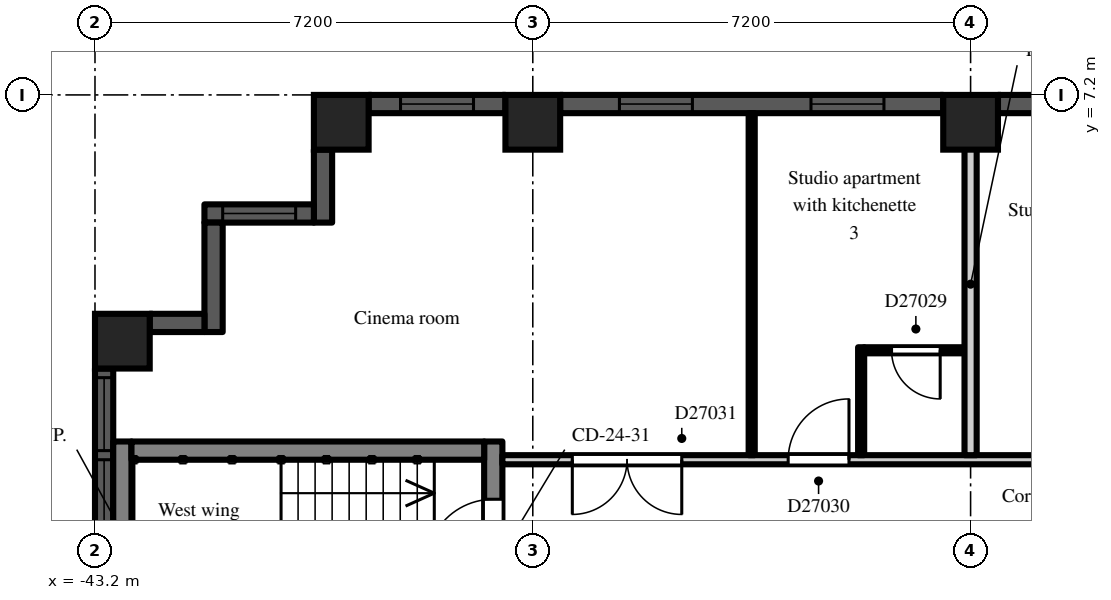
"""IFC4 building model, lengths in metres.
Left out: names, types, materials, properties, quantities, classifications, styles, units other than length and angle.
Written with IfcOpenShell. Run it as: python <this file> out.ifc"""

import sys

from ifc_helpers import new_model, si_unit, direction, frame, frame_2d, origin, origin_2d, place, context, subcontext, project, spatial, rectangle, extrude, element, fill, save


model = new_model("IFC4")
c1 = context("Model", 3, precision=1e-05, world=origin(), true_north=direction((0.0, 1.0)))
c2 = subcontext(c1, "Body", "Model", "MODEL_VIEW")
j1 = project(units=[si_unit("LENGTHUNIT", "METRE"), si_unit("PLANEANGLEUNIT", "RADIAN")], contexts=[c1])
p1 = place(None, origin())
s1 = spatial("IfcSite", under=j1, at=p1, CompositionType="ELEMENT")
p2 = place(p1, origin())
s2 = spatial("IfcBuilding", under=s1, at=p2, CompositionType="ELEMENT")
p3 = place(p2, frame((0.0, 0.0, 188.7)))
s3 = spatial("IfcBuildingStorey", under=s2, at=p3, CompositionType="ELEMENT", Elevation=188.7)
for number, where, z_axis, x_axis in (
    (1, (-42.75, 3.15, 0.0), (0.0, 0.0, 1.0), (1.0, 0.0, 0.0)),
    (2, (-39.15, 6.75, 0.0), (0.0, 0.0, 1.0), (1.0, 0.0, 0.0)),
    (3, (-36.0, 6.75, 0.0), (0.0, 0.0, 1.0), (1.0, 0.0, 0.0)),
    (4, (-28.8, 6.75, 0.0), (0.0, 0.0, 1.0), (1.0, 0.0, 0.0)),
):
    element("IfcColumn", number, at=place(p3, frame(where, z_axis=z_axis, x_axis=x_axis)), inside=s3, PredefinedType="COLUMN", context=c2, shape_type="SweptSolid", body=[
        extrude(rectangle(XDim=0.9, YDim=0.9, at=origin_2d()), origin(), (0.0, 0.0, 1.0), 3.0),
    ])
p4 = place(p3, frame((-25.2, 7.05, 0.0), z_axis=(0.0, 0.0, 1.0), x_axis=(-1.0, 0.0, 0.0)))
e5 = element("IfcWall", 5, at=p4, inside=s3, PredefinedType="SOLIDWALL", context=c2, shape_type="SweptSolid", body=[
    extrude(rectangle(XDim=3.15, YDim=0.3, at=frame_2d((1.575, 0.0))), origin(), (0.0, 0.0, 1.0), 2.2),
])
p5 = place(p4, frame((0.975, 0.0, 0.2)))
e6 = element("IfcOpeningElement", 6, at=p5, cuts=e5, PredefinedType="OPENING", context=c2, shape_type="SweptSolid", body=[
    extrude(rectangle(XDim=1.2, YDim=1.85, at=frame_2d((0.6, 0.925))), frame((0.0, 0.16, 0.0), z_axis=(0.0, -1.0, 0.0), x_axis=(1.0, 0.0, 0.0)), (0.0, 0.0, 1.0), 0.32),
])
p6 = place(p3, frame((-29.25, 7.05, 0.0), z_axis=(0.0, 0.0, 1.0), x_axis=(-1.0, 0.0, 0.0)))
e7 = element("IfcWall", 7, at=p6, inside=s3, PredefinedType="SOLIDWALL", context=c2, shape_type="SweptSolid", body=[
    extrude(rectangle(XDim=6.3, YDim=0.3, at=frame_2d((3.15, 0.0))), origin(), (0.0, 0.0, 1.0), 2.2),
])
p7 = place(p6, frame((0.975, 0.0, 0.2)))
e8 = element("IfcOpeningElement", 8, at=p7, cuts=e7, PredefinedType="OPENING", context=c2, shape_type="SweptSolid", body=[
    extrude(rectangle(XDim=1.2, YDim=1.85, at=frame_2d((0.6, 0.925))), frame((0.0, 0.16, 0.0), z_axis=(0.0, -1.0, 0.0), x_axis=(1.0, 0.0, 0.0)), (0.0, 0.0, 1.0), 0.32),
])
p8 = place(p6, frame((4.125, 0.0, 0.2)))
e9 = element("IfcOpeningElement", 9, at=p8, cuts=e7, PredefinedType="OPENING", context=c2, shape_type="SweptSolid", body=[
    extrude(rectangle(XDim=1.2, YDim=1.85, at=frame_2d((0.6, 0.925))), frame((0.0, 0.16, 0.0), z_axis=(0.0, -1.0, 0.0), x_axis=(1.0, 0.0, 0.0)), (0.0, 0.0, 1.0), 0.32),
])
p9 = place(p3, frame((-36.45, 7.05, 0.0), z_axis=(0.0, 0.0, 1.0), x_axis=(-1.0, 0.0, 0.0)))
e10 = element("IfcWall", 10, at=p9, inside=s3, PredefinedType="SOLIDWALL", context=c2, shape_type="SweptSolid", body=[
    extrude(rectangle(XDim=2.25, YDim=0.3, at=frame_2d((1.125, 0.0))), origin(), (0.0, 0.0, 1.0), 2.2),
])
p10 = place(p9, frame((0.525, 0.0, 0.2)))
e11 = element("IfcOpeningElement", 11, at=p10, cuts=e10, PredefinedType="OPENING", context=c2, shape_type="SweptSolid", body=[
    extrude(rectangle(XDim=1.2, YDim=1.85, at=frame_2d((0.6, 0.925))), frame((0.0, 0.16, 0.0), z_axis=(0.0, -1.0, 0.0), x_axis=(1.0, 0.0, 0.0)), (0.0, 0.0, 1.0), 0.32),
])
p11 = place(p3, frame((-39.45, 6.3, 0.0), z_axis=(0.0, 0.0, 1.0), x_axis=(0.0, -1.0, 0.0)))
e12 = element("IfcWall", 12, at=p11, inside=s3, PredefinedType="SOLIDWALL", context=c2, shape_type="SweptSolid", body=[
    extrude(rectangle(XDim=1.2, YDim=0.3, at=frame_2d((0.6, 0.0))), origin(), (0.0, 0.0, 1.0), 2.6),
])
p12 = place(p3, frame((-39.6, 5.25, 0.0), z_axis=(0.0, 0.0, 1.0), x_axis=(-1.0, 0.0, 0.0)))
e13 = element("IfcWall", 13, at=p12, inside=s3, PredefinedType="SOLIDWALL", context=c2, shape_type="SweptSolid", body=[
    extrude(rectangle(XDim=1.8, YDim=0.3, at=frame_2d((0.9, 0.0))), origin(), (0.0, 0.0, 1.0), 2.6),
])
p13 = place(p12, frame((0.3, 0.0, 0.2)))
e14 = element("IfcOpeningElement", 14, at=p13, cuts=e13, PredefinedType="OPENING", context=c2, shape_type="SweptSolid", body=[
    extrude(rectangle(XDim=1.2, YDim=1.85, at=frame_2d((0.6, 0.925))), frame((0.0, 0.16, 0.0), z_axis=(0.0, -1.0, 0.0), x_axis=(1.0, 0.0, 0.0)), (0.0, 0.0, 1.0), 0.32),
])
p14 = place(p3, frame((-41.25, 5.1, 0.0), z_axis=(0.0, 0.0, 1.0), x_axis=(0.0, -1.0, 0.0)))
e15 = element("IfcWall", 15, at=p14, inside=s3, PredefinedType="SOLIDWALL", context=c2, shape_type="SweptSolid", body=[
    extrude(rectangle(XDim=1.8, YDim=0.3, at=frame_2d((0.9, 0.0))), origin(), (0.0, 0.0, 1.0), 2.6),
])
p15 = place(p3, frame((-41.4, 3.45, 0.0), z_axis=(0.0, 0.0, 1.0), x_axis=(-1.0, 0.0, 0.0)))
e16 = element("IfcWall", 16, at=p15, inside=s3, PredefinedType="SOLIDWALL", context=c2, shape_type="SweptSolid", body=[
    extrude(rectangle(XDim=0.9, YDim=0.3, at=frame_2d((0.45, 0.0))), origin(), (0.0, 0.0, 1.0), 2.6),
])
p16 = place(p3, frame((-43.05, 2.7, 0.0), z_axis=(0.0, 0.0, 1.0), x_axis=(0.0, -1.0, 0.0)))
e17 = element("IfcWall", 17, at=p16, inside=s3, PredefinedType="SOLIDWALL", context=c2, shape_type="SweptSolid", body=[
    extrude(rectangle(XDim=5.4, YDim=0.3, at=frame_2d((2.7, 0.0))), origin(), (0.0, 0.0, 1.0), 2.2),
])
p17 = place(p16, frame((1.5, 0.0, 0.2)))
e18 = element("IfcOpeningElement", 18, at=p17, cuts=e17, PredefinedType="OPENING", context=c2, shape_type="SweptSolid", body=[
    extrude(rectangle(XDim=2.4, YDim=1.85, at=frame_2d((1.2, 0.925))), frame((0.0, 0.16, 0.0), z_axis=(0.0, -1.0, 0.0), x_axis=(1.0, 0.0, 0.0)), (0.0, 0.0, 1.0), 0.32),
])
p18 = place(p16, frame((0.15, 0.0, 0.2)))
e19 = element("IfcOpeningElement", 19, at=p18, cuts=e17, PredefinedType="OPENING", context=c2, shape_type="SweptSolid", body=[
    extrude(rectangle(XDim=1.2, YDim=1.85, at=frame_2d((0.6, 0.925))), frame((0.0, 0.16, 0.0), z_axis=(0.0, -1.0, 0.0), x_axis=(1.0, 0.0, 0.0)), (0.0, 0.0, 1.0), 0.32),
])
p19 = place(p3, frame((-36.65, -1.5, 0.0), z_axis=(0.0, 0.0, 1.0), x_axis=(0.0, 1.0, 0.0)))
e20 = element("IfcWall", 20, at=p19, inside=s3, PredefinedType="SHEAR", context=c2, shape_type="SweptSolid", body=[
    extrude(rectangle(XDim=3.0, YDim=0.3, at=frame_2d((1.5, 0.0))), origin(), (0.0, 0.0, 1.0), 2.6),
])
p20 = place(p19, frame((0.95, 0.0, 0.0)))
e21 = element("IfcOpeningElement", 21, at=p20, cuts=e20, PredefinedType="OPENING", context=c2, shape_type="SweptSolid", body=[
    extrude(rectangle(XDim=1.1, YDim=2.1, at=frame_2d((0.55, 1.05))), frame((0.0, 0.16, 0.0), z_axis=(0.0, -1.0, 0.0), x_axis=(1.0, 0.0, 0.0)), (0.0, 0.0, 1.0), 0.32),
])
p21 = place(p3, frame((-42.75, -1.5, 0.0), z_axis=(0.0, 0.0, 1.0), x_axis=(0.0, 1.0, 0.0)))
e22 = element("IfcWall", 22, at=p21, inside=s3, PredefinedType="SHEAR", context=c2, shape_type="SweptSolid", body=[
    extrude(rectangle(XDim=3.0, YDim=0.3, at=frame_2d((1.5, 0.0))), origin(), (0.0, 0.0, 1.0), 2.6),
])
p22 = place(p3, frame((-36.8, 1.35, 0.0), z_axis=(0.0, 0.0, 1.0), x_axis=(-1.0, 0.0, 0.0)))
e23 = element("IfcWall", 23, at=p22, inside=s3, PredefinedType="SHEAR", context=c2, shape_type="SweptSolid", body=[
    extrude(rectangle(XDim=5.8, YDim=0.3, at=frame_2d((2.9, 0.0))), origin(), (0.0, 0.0, 1.0), 2.6),
])
p23 = place(p3, frame((-36.5, 1.2, 0.0), z_axis=(0.0, 0.0, 1.0), x_axis=(1.0, 0.0, 0.0)))
e24 = element("IfcWall", 24, at=p23, inside=s3, PredefinedType="PARTITIONING", context=c2, shape_type="SweptSolid", body=[
    extrude(rectangle(XDim=14.9, YDim=0.15, at=frame_2d((7.45, 0.0))), origin(), (0.0, 0.0, 1.0), 2.6),
])
p24 = place(p23, frame((10.1, 0.0, 0.0)))
e25 = element("IfcOpeningElement", 25, at=p24, cuts=e24, PredefinedType="OPENING", context=c2, shape_type="SweptSolid", body=[
    extrude(rectangle(XDim=1.0, YDim=2.1, at=frame_2d((0.5, 1.05))), frame((0.0, 0.085, 0.0), z_axis=(0.0, -1.0, 0.0), x_axis=(1.0, 0.0, 0.0)), (0.0, 0.0, 1.0), 0.17),
])
p25 = place(p23, frame((4.7, 0.0, 0.0)))
e26 = element("IfcOpeningElement", 26, at=p25, cuts=e24, PredefinedType="OPENING", context=c2, shape_type="SweptSolid", body=[
    extrude(rectangle(XDim=1.0, YDim=2.1, at=frame_2d((0.5, 1.05))), frame((0.0, 0.085, 0.0), z_axis=(0.0, -1.0, 0.0), x_axis=(1.0, 0.0, 0.0)), (0.0, 0.0, 1.0), 0.17),
])
p26 = place(p23, frame((1.15, 0.0, 0.0)))
e27 = element("IfcOpeningElement", 27, at=p26, cuts=e24, PredefinedType="OPENING", context=c2, shape_type="SweptSolid", body=[
    extrude(rectangle(XDim=1.8, YDim=2.1, at=frame_2d((0.9, 1.05))), frame((0.0, 0.085, 0.0), z_axis=(0.0, -1.0, 0.0), x_axis=(1.0, 0.0, 0.0)), (0.0, 0.0, 1.0), 0.17),
])
p27 = place(p3, frame((-32.4, 1.275, 0.0), z_axis=(0.0, 0.0, 1.0), x_axis=(0.0, 1.0, 0.0)))
e28 = element("IfcWall", 28, at=p27, inside=s3, PredefinedType="PARTITIONING", context=c2, shape_type="SweptSolid", body=[
    extrude(rectangle(XDim=5.625, YDim=0.1, at=frame_2d((2.812, 0.0))), origin(), (0.0, 0.0, 1.0), 2.6),
])
p28 = place(p3, frame((-30.6, 1.275, 0.0), z_axis=(0.0, 0.0, 1.0), x_axis=(0.0, 1.0, 0.0)))
e29 = element("IfcWall", 29, at=p28, inside=s3, PredefinedType="PARTITIONING", context=c2, shape_type="SweptSolid", body=[
    extrude(rectangle(XDim=1.775, YDim=0.1, at=frame_2d((0.888, 0.0))), origin(), (0.0, 0.0, 1.0), 2.6),
])
p29 = place(p3, frame((-30.55, 3.0, 0.0), z_axis=(0.0, 0.0, 1.0), x_axis=(1.0, 0.0, 0.0)))
e30 = element("IfcWall", 30, at=p29, inside=s3, PredefinedType="PARTITIONING", context=c2, shape_type="SweptSolid", body=[
    extrude(rectangle(XDim=1.65, YDim=0.1, at=frame_2d((0.825, 0.0))), origin(), (0.0, 0.0, 1.0), 2.6),
])
p30 = place(p29, frame((0.45, 0.0, 0.0)))
e31 = element("IfcOpeningElement", 31, at=p30, cuts=e30, PredefinedType="OPENING", context=c2, shape_type="SweptSolid", body=[
    extrude(rectangle(XDim=0.8, YDim=2.1, at=frame_2d((0.4, 1.05))), frame((0.0, 0.06, 0.0), z_axis=(0.0, -1.0, 0.0), x_axis=(1.0, 0.0, 0.0)), (0.0, 0.0, 1.0), 0.12),
])
p31 = place(p3, frame((-28.8, 1.275, 0.0), z_axis=(0.0, 0.0, 1.0), x_axis=(0.0, 1.0, 0.0)))
e32 = element("IfcWall", 32, at=p31, inside=s3, PredefinedType="PARTITIONING", context=c2, shape_type="SweptSolid", body=[
    extrude(rectangle(XDim=5.625, YDim=0.2, at=frame_2d((2.812, 0.0))), origin(), (0.0, 0.0, 1.0), 2.6),
])
p32 = place(p7, origin())
e33 = element("IfcWindow", 33, at=p32, inside=s3, PartitioningType="SINGLE_PANEL", PredefinedType="WINDOW", context=c2, shape_type="SweptSolid", body=[
    extrude(rectangle(XDim=1.2, YDim=1.85, at=frame_2d((0.6, 0.925))), frame((0.0, 0.03, 0.0), z_axis=(0.0, -1.0, 0.0), x_axis=(1.0, 0.0, 0.0)), (0.0, 0.0, 1.0), 0.06),
])
fill(e8, e33)
p33 = place(p8, origin())
e34 = element("IfcWindow", 34, at=p33, inside=s3, PartitioningType="SINGLE_PANEL", PredefinedType="WINDOW", context=c2, shape_type="SweptSolid", body=[
    extrude(rectangle(XDim=1.2, YDim=1.85, at=frame_2d((0.6, 0.925))), frame((0.0, 0.03, 0.0), z_axis=(0.0, -1.0, 0.0), x_axis=(1.0, 0.0, 0.0)), (0.0, 0.0, 1.0), 0.06),
])
fill(e9, e34)
p34 = place(p10, origin())
e35 = element("IfcWindow", 35, at=p34, inside=s3, PartitioningType="SINGLE_PANEL", PredefinedType="WINDOW", context=c2, shape_type="SweptSolid", body=[
    extrude(rectangle(XDim=1.2, YDim=1.85, at=frame_2d((0.6, 0.925))), frame((0.0, 0.03, 0.0), z_axis=(0.0, -1.0, 0.0), x_axis=(1.0, 0.0, 0.0)), (0.0, 0.0, 1.0), 0.06),
])
fill(e11, e35)
p35 = place(p13, origin())
e36 = element("IfcWindow", 36, at=p35, inside=s3, PartitioningType="SINGLE_PANEL", PredefinedType="WINDOW", context=c2, shape_type="SweptSolid", body=[
    extrude(rectangle(XDim=1.2, YDim=1.85, at=frame_2d((0.6, 0.925))), frame((0.0, 0.03, 0.0), z_axis=(0.0, -1.0, 0.0), x_axis=(1.0, 0.0, 0.0)), (0.0, 0.0, 1.0), 0.06),
])
fill(e14, e36)
p36 = place(p17, origin())
e37 = element("IfcWindow", 37, at=p36, inside=s3, PartitioningType="SINGLE_PANEL", PredefinedType="WINDOW", context=c2, shape_type="SweptSolid", body=[
    extrude(rectangle(XDim=2.4, YDim=1.85, at=frame_2d((1.2, 0.925))), frame((0.0, 0.03, 0.0), z_axis=(0.0, -1.0, 0.0), x_axis=(1.0, 0.0, 0.0)), (0.0, 0.0, 1.0), 0.06),
])
fill(e18, e37)
p37 = place(p18, origin())
e38 = element("IfcWindow", 38, at=p37, inside=s3, PartitioningType="SINGLE_PANEL", PredefinedType="WINDOW", context=c2, shape_type="SweptSolid", body=[
    extrude(rectangle(XDim=1.2, YDim=1.85, at=frame_2d((0.6, 0.925))), frame((0.0, 0.03, 0.0), z_axis=(0.0, -1.0, 0.0), x_axis=(1.0, 0.0, 0.0)), (0.0, 0.0, 1.0), 0.06),
])
fill(e19, e38)
p38 = place(p20, origin())
e39 = element("IfcDoor", 39, at=p38, inside=s3, OperationType="SINGLE_SWING_LEFT", PredefinedType="DOOR", context=c2, shape_type="SweptSolid", body=[
    extrude(rectangle(XDim=1.1, YDim=2.1, at=frame_2d((0.55, 1.05))), frame((0.0, 0.025, 0.0), z_axis=(0.0, -1.0, 0.0), x_axis=(1.0, 0.0, 0.0)), (0.0, 0.0, 1.0), 0.05),
])
fill(e21, e39)
p39 = place(p30, frame((0.8, 0.0, 0.0), z_axis=(0.0, 0.0, 1.0), x_axis=(-1.0, 0.0, 0.0)))
e40 = element("IfcDoor", 40, at=p39, inside=s3, OperationType="SINGLE_SWING_LEFT", PredefinedType="DOOR", context=c2, shape_type="SweptSolid", body=[
    extrude(rectangle(XDim=0.8, YDim=2.1, at=frame_2d((0.4, 1.05))), frame((0.0, 0.025, 0.0), z_axis=(0.0, -1.0, 0.0), x_axis=(1.0, 0.0, 0.0)), (0.0, 0.0, 1.0), 0.05),
])
fill(e31, e40)
p40 = place(p25, origin())
e41 = element("IfcDoor", 41, at=p40, inside=s3, OperationType="SINGLE_SWING_RIGHT", PredefinedType="DOOR", context=c2, shape_type="SweptSolid", body=[
    extrude(rectangle(XDim=1.0, YDim=2.1, at=frame_2d((0.5, 1.05))), frame((0.0, 0.025, 0.0), z_axis=(0.0, -1.0, 0.0), x_axis=(1.0, 0.0, 0.0)), (0.0, 0.0, 1.0), 0.05),
])
fill(e26, e41)
p41 = place(p26, frame((1.8, 0.0, 0.0), z_axis=(0.0, 0.0, 1.0), x_axis=(-1.0, 0.0, 0.0)))
e42 = element("IfcDoor", 42, at=p41, inside=s3, OperationType="DOUBLE_DOOR_DOUBLE_SWING", PredefinedType="DOOR", context=c2, shape_type="SweptSolid", body=[
    extrude(rectangle(XDim=1.8, YDim=2.1, at=frame_2d((0.9, 1.05))), frame((0.0, 0.025, 0.0), z_axis=(0.0, -1.0, 0.0), x_axis=(1.0, 0.0, 0.0)), (0.0, 0.0, 1.0), 0.05),
])
fill(e27, e42)
save(model, sys.argv[1])
